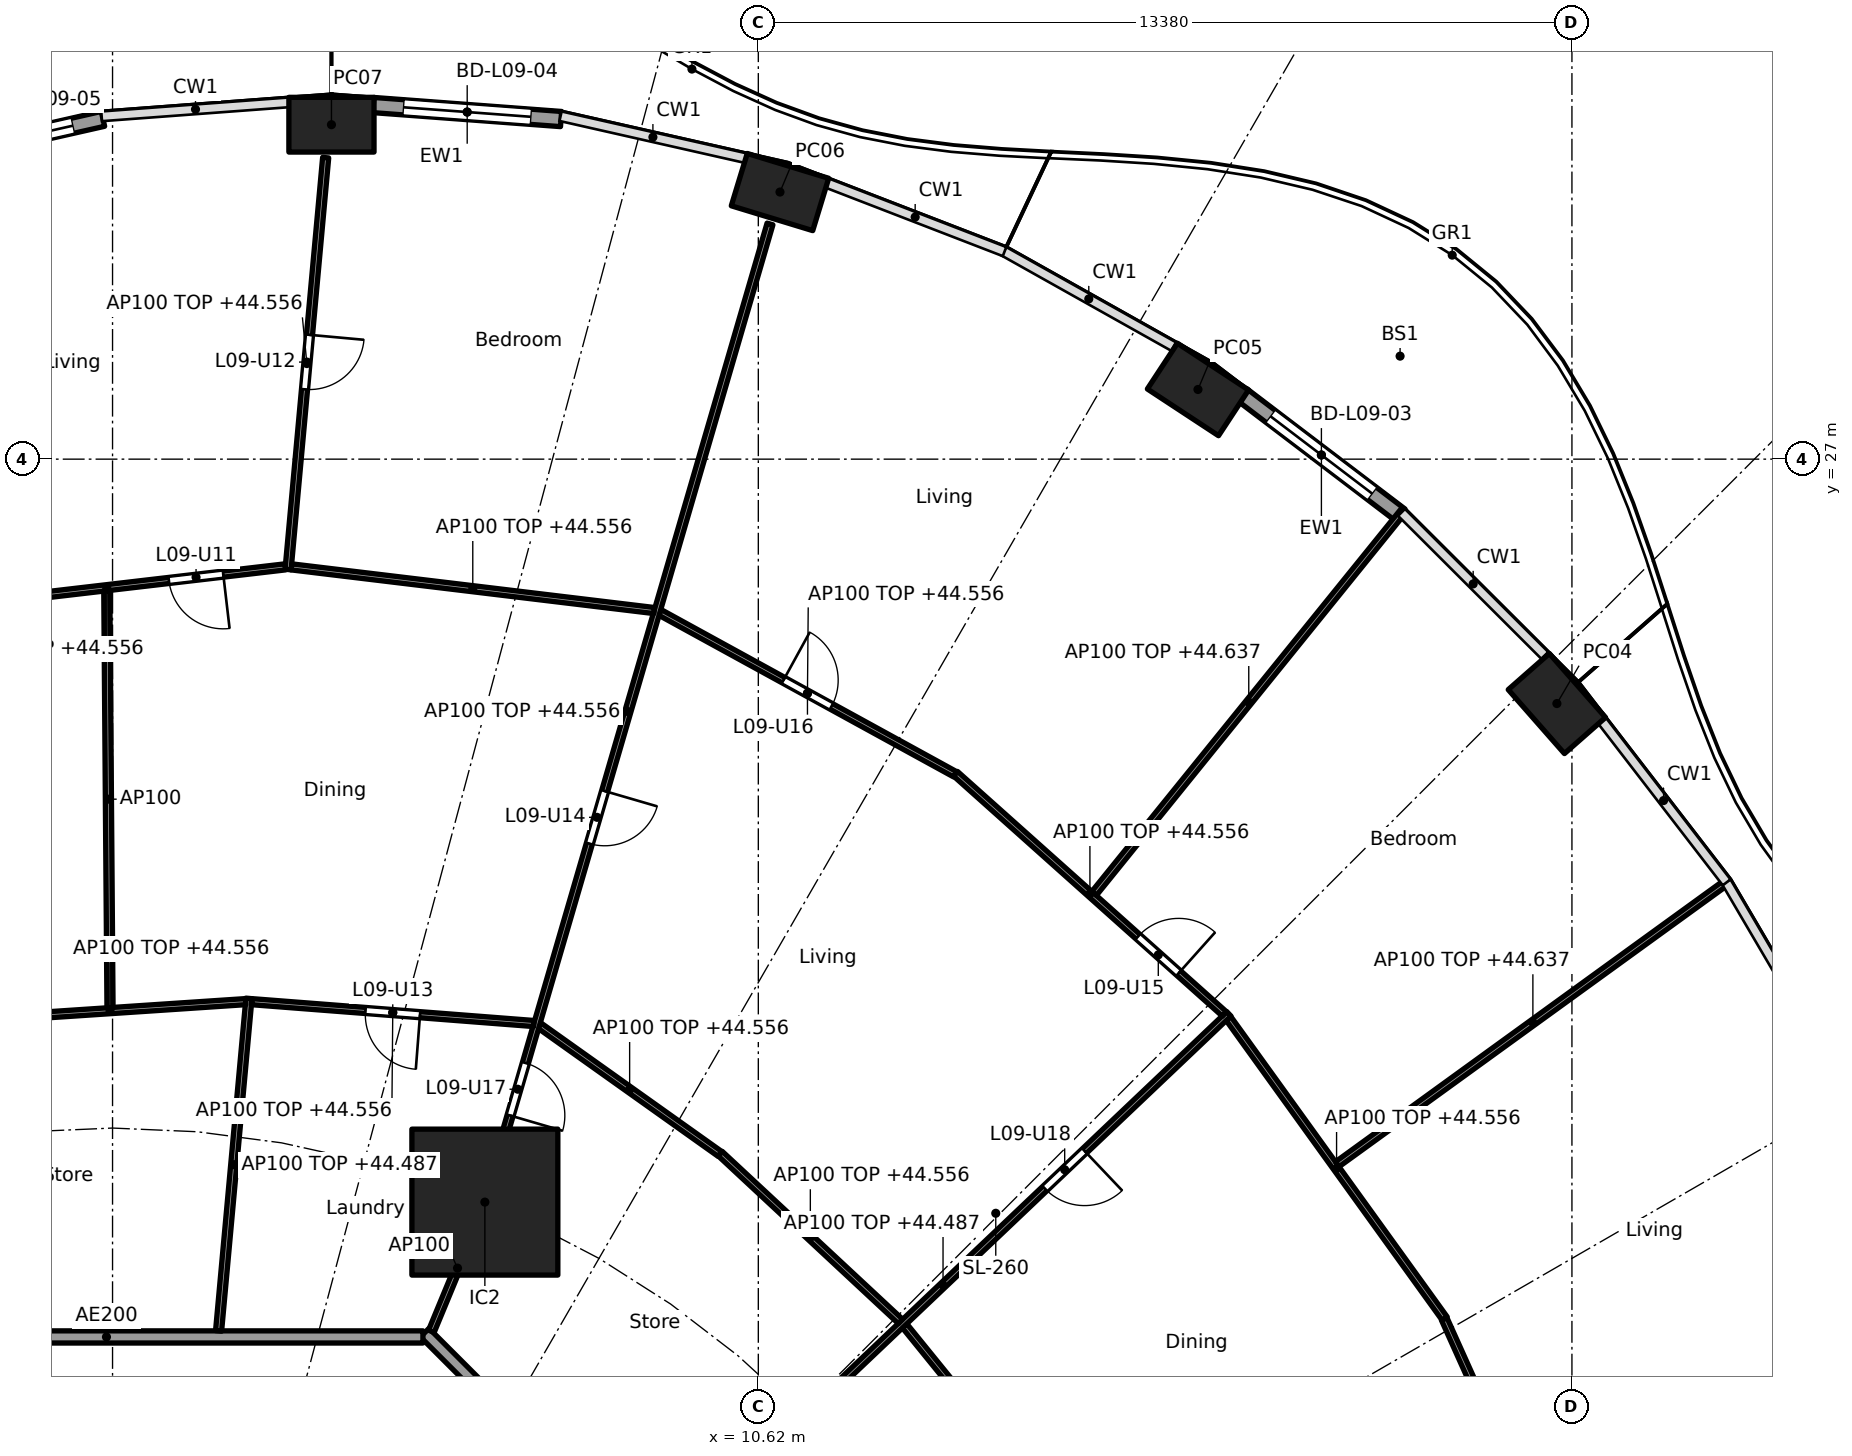
"""IFC4 building model, lengths in metres.
Left out: names, types, materials, properties, quantities, classifications, styles, units other than length and angle.
Written with IfcOpenShell. Run it as: python <this file> out.ifc"""

import sys

from ifc_helpers import new_model, si_unit, direction, frame, frame_2d, origin, origin_2d, place, context, subcontext, project, spatial, rectangle, hollow_rectangle, extrude, element, fill, save


model = new_model("IFC4")
c1 = context("Model", 3, precision=1e-05, world=origin(), true_north=direction((0.0, 1.0)))
c2 = subcontext(c1, "Body", "Model", "MODEL_VIEW")
j1 = project(units=[si_unit("LENGTHUNIT", "METRE"), si_unit("PLANEANGLEUNIT", "RADIAN")], contexts=[c1])
p1 = place(None, origin())
s1 = spatial("IfcSite", under=j1, at=p1, CompositionType="ELEMENT")
p2 = place(p1, origin())
s2 = spatial("IfcBuilding", under=s1, at=p2, CompositionType="ELEMENT")
p3 = place(p2, frame((0.0, 0.0, 41.8)))
s3 = spatial("IfcBuildingStorey", under=s2, at=p3, CompositionType="ELEMENT", Elevation=41.8)
for number, where, z_axis, x_axis in (
    (1, (23.752, 22.981, 0.0), (0.0, 0.0, 1.0), (-0.66, 0.751, 0.0)),
    (2, (17.85, 28.146, 0.0), (0.0, 0.0, 1.0), (-0.836, 0.549, 0.0)),
    (3, (10.976, 31.393, 0.0), (0.0, 0.0, 1.0), (-0.957, 0.292, 0.0)),
    (4, (3.6, 32.5, 0.0), (0.0, 0.0, 1.0), (-1.0, 0.0, 0.0)),
):
    element("IfcColumn", number, at=place(p3, frame(where, z_axis=z_axis, x_axis=x_axis)), inside=s3, PredefinedType="COLUMN", context=c2, shape_type="SweptSolid", body=[
        extrude(hollow_rectangle(XDim=1.4, YDim=0.9, WallThickness=0.05, at=origin_2d()), origin(), (0.0, 0.0, 1.0), 3.7),
    ])
p4 = place(p3, frame((6.123, 14.782, 0.0), z_axis=(0.0, 0.0, 1.0), x_axis=(1.0, 0.0, 0.0)))
e5 = element("IfcColumn", 5, at=p4, inside=s3, PredefinedType="COLUMN", context=c2, shape_type="SweptSolid", body=[
    extrude(rectangle(XDim=2.4, YDim=2.4, at=origin_2d()), origin(), (0.0, 0.0, 1.0), 3.7),
])
p5 = place(p3, frame((18.582, 28.056, 0.0), z_axis=(0.0, 0.0, 1.0), x_axis=(0.796022293214, -0.605267303517, 0.0)))
e6 = element("IfcWall", 6, at=p5, inside=s3, PredefinedType="SOLIDWALL", context=c2, shape_type="SweptSolid", body=[
    extrude(rectangle(XDim=3.262, YDim=0.25, at=frame_2d((1.631, 0.0))), origin(), (0.0, 0.0, 1.0), 3.44),
])
p6 = place(p5, frame((0.581, 0.0, 0.0)))
e7 = element("IfcOpeningElement", 7, at=p6, cuts=e6, PredefinedType="OPENING", context=c2, shape_type="SweptSolid", body=[
    extrude(rectangle(XDim=2.1, YDim=2.4, at=frame_2d((1.05, 1.2))), frame((0.0, 0.135, 0.0), z_axis=(0.0, -1.0, 0.0), x_axis=(1.0, 0.0, 0.0)), (0.0, 0.0, 1.0), 0.27),
])
p7 = place(p3, frame((4.289, 32.823, 0.0), z_axis=(0.0, 0.0, 1.0), x_axis=(0.997230834878, -0.074368420505, 0.0)))
e8 = element("IfcWall", 8, at=p7, inside=s3, PredefinedType="SOLIDWALL", context=c2, shape_type="SweptSolid", body=[
    extrude(rectangle(XDim=3.096, YDim=0.25, at=frame_2d((1.548, 0.0))), origin(), (0.0, 0.0, 1.0), 3.44),
])
p8 = place(p7, frame((0.498, 0.0, 0.0)))
e9 = element("IfcOpeningElement", 9, at=p8, cuts=e8, PredefinedType="OPENING", context=c2, shape_type="SweptSolid", body=[
    extrude(rectangle(XDim=2.1, YDim=2.4, at=frame_2d((1.05, 1.2))), frame((0.0, 0.135, 0.0), z_axis=(0.0, -1.0, 0.0), x_axis=(1.0, 0.0, 0.0)), (0.0, 0.0, 1.0), 0.27),
])
p9 = place(p3, frame((-3.195, 31.908, 0.0), z_axis=(0.0, 0.0, 1.0), x_axis=(0.975331134677, 0.220746863466, 0.0)))
e10 = element("IfcWall", 10, at=p9, inside=s3, PredefinedType="SOLIDWALL", context=c2, shape_type="SweptSolid", body=[
    extrude(rectangle(XDim=3.115, YDim=0.25, at=frame_2d((1.557, 0.0))), origin(), (0.0, 0.0, 1.0), 3.44),
])
p10 = place(p9, frame((0.507, 0.0, 0.0)))
e11 = element("IfcOpeningElement", 11, at=p10, cuts=e10, PredefinedType="OPENING", context=c2, shape_type="SweptSolid", body=[
    extrude(rectangle(XDim=2.1, YDim=2.4, at=frame_2d((1.05, 1.2))), frame((0.0, 0.135, 0.0), z_axis=(0.0, -1.0, 0.0), x_axis=(1.0, 0.0, 0.0)), (0.0, 0.0, 1.0), 0.27),
])
p11 = place(p3, frame((12.635, 5.134, 0.0), z_axis=(0.0, 0.0, 1.0), x_axis=(-0.707106781187, 0.707106781187, 0.0)))
e12 = element("IfcWall", 12, at=p11, inside=s3, PredefinedType="PARTITIONING", context=c2, shape_type="SweptSolid", body=[
    extrude(rectangle(XDim=10.609, YDim=0.2, at=frame_2d((5.305, 0.0))), origin(), (0.0, 0.0, 1.0), 3.44),
])
p12 = place(p3, frame((5.104, 12.565, 0.0), z_axis=(0.0, 0.0, 1.0), x_axis=(-1.0, 0.0, 0.0)))
e13 = element("IfcWall", 13, at=p12, inside=s3, PredefinedType="PARTITIONING", context=c2, shape_type="SweptSolid", body=[
    extrude(rectangle(XDim=10.409, YDim=0.2, at=frame_2d((5.205, 0.0))), origin(), (0.0, 0.0, 1.0), 3.44),
])
p13 = place(p3, frame((24.273, 7.584, 0.0), z_axis=(0.0, 0.0, 1.0), x_axis=(-0.410201529109, 0.911994904326, 0.0)))
e14 = element("IfcWall", 14, at=p13, inside=s3, PredefinedType="PARTITIONING", context=c2, shape_type="SweptSolid", body=[
    extrude(rectangle(XDim=5.787, YDim=0.1, at=frame_2d((2.894, 0.0))), origin(), (0.0, 0.0, 1.0), 2.756),
])
p14 = place(p13, frame((2.444, 0.0, 0.0)))
e15 = element("IfcOpeningElement", 15, at=p14, cuts=e14, PredefinedType="OPENING", context=c2, shape_type="SweptSolid", body=[
    extrude(rectangle(XDim=0.9, YDim=2.1, at=frame_2d((0.45, 1.05))), frame((0.0, 0.06, 0.0), z_axis=(0.0, -1.0, 0.0), x_axis=(1.0, 0.0, 0.0)), (0.0, 0.0, 1.0), 0.12),
])
p15 = place(p3, frame((15.614, 9.559, 0.0), z_axis=(0.0, 0.0, 1.0), x_axis=(-0.63012473344, 0.776493928056, 0.0)))
e16 = element("IfcWall", 16, at=p15, inside=s3, PredefinedType="PARTITIONING", context=c2, shape_type="SweptSolid", body=[
    extrude(rectangle(XDim=4.106, YDim=0.1, at=frame_2d((2.053, 0.0))), origin(), (0.0, 0.0, 1.0), 2.756),
])
p16 = place(p15, frame((1.628, 0.0, 0.0)))
e17 = element("IfcOpeningElement", 17, at=p16, cuts=e16, PredefinedType="OPENING", context=c2, shape_type="SweptSolid", body=[
    extrude(rectangle(XDim=0.9, YDim=2.1, at=frame_2d((0.45, 1.05))), frame((0.0, 0.06, 0.0), z_axis=(0.0, -1.0, 0.0), x_axis=(1.0, 0.0, 0.0)), (0.0, 0.0, 1.0), 0.12),
])
p17 = place(p3, frame((21.908, 12.866, 0.0), z_axis=(0.0, 0.0, 1.0), x_axis=(-0.584558392935, 0.811351640936, 0.0)))
e18 = element("IfcWall", 18, at=p17, inside=s3, PredefinedType="PARTITIONING", context=c2, shape_type="SweptSolid", body=[
    extrude(rectangle(XDim=6.084, YDim=0.1, at=frame_2d((3.042, 0.0))), origin(), (0.0, 0.0, 1.0), 2.756),
])
p18 = place(p3, frame((20.141, 15.405, 0.0), z_axis=(0.0, 0.0, 1.0), x_axis=(0.809834895779, 0.58665785734, 0.0)))
e19 = element("IfcWall", 19, at=p18, inside=s3, PredefinedType="PARTITIONING", context=c2, shape_type="SweptSolid", body=[
    extrude(rectangle(XDim=7.945, YDim=0.1, at=frame_2d((3.973, 0.0))), origin(), (0.0, 0.0, 1.0), 2.837),
])
p19 = place(p3, frame((8.957, 8.953, 0.0), z_axis=(0.0, 0.0, 1.0), x_axis=(0.725250022034, 0.688485588476, 0.0)))
e20 = element("IfcWall", 20, at=p19, inside=s3, PredefinedType="PARTITIONING", context=c2, shape_type="SweptSolid", body=[
    extrude(rectangle(XDim=12.963, YDim=0.1, at=frame_2d((6.481, 0.0))), origin(), (0.0, 0.0, 1.0), 2.687),
])
p20 = place(p19, frame((8.79, 0.0, 0.0)))
e21 = element("IfcOpeningElement", 21, at=p20, cuts=e20, PredefinedType="OPENING", context=c2, shape_type="SweptSolid", body=[
    extrude(rectangle(XDim=0.9, YDim=2.1, at=frame_2d((0.45, 1.05))), frame((0.0, 0.06, 0.0), z_axis=(0.0, -1.0, 0.0), x_axis=(1.0, 0.0, 0.0)), (0.0, 0.0, 1.0), 0.12),
])
p21 = place(p3, frame((12.958, 12.82, 0.0), z_axis=(0.0, 0.0, 1.0), x_axis=(-0.732028724098, 0.681273768096, 0.0)))
e22 = element("IfcWall", 22, at=p21, inside=s3, PredefinedType="PARTITIONING", context=c2, shape_type="SweptSolid", body=[
    extrude(rectangle(XDim=4.05, YDim=0.1, at=frame_2d((2.025, 0.0))), origin(), (0.0, 0.0, 1.0), 2.756),
])
p22 = place(p3, frame((18.285, 17.877, 0.0), z_axis=(0.0, 0.0, 1.0), x_axis=(-0.745812746724, 0.666155647596, 0.0)))
e23 = element("IfcWall", 23, at=p22, inside=s3, PredefinedType="PARTITIONING", context=c2, shape_type="SweptSolid", body=[
    extrude(rectangle(XDim=5.931, YDim=0.1, at=frame_2d((2.965, 0.0))), origin(), (0.0, 0.0, 1.0), 2.756),
])
p23 = place(p22, frame((1.008, 0.0, 0.0)))
e24 = element("IfcOpeningElement", 24, at=p23, cuts=e23, PredefinedType="OPENING", context=c2, shape_type="SweptSolid", body=[
    extrude(rectangle(XDim=0.9, YDim=2.1, at=frame_2d((0.45, 1.05))), frame((0.0, 0.06, 0.0), z_axis=(0.0, -1.0, 0.0), x_axis=(1.0, 0.0, 0.0)), (0.0, 0.0, 1.0), 0.12),
])
p24 = place(p3, frame((16.142, 19.858, 0.0), z_axis=(0.0, 0.0, 1.0), x_axis=(0.628738066508, 0.777617157555, 0.0)))
e25 = element("IfcWall", 25, at=p24, inside=s3, PredefinedType="PARTITIONING", context=c2, shape_type="SweptSolid", body=[
    extrude(rectangle(XDim=8.091, YDim=0.1, at=frame_2d((4.045, 0.0))), origin(), (0.0, 0.0, 1.0), 2.837),
])
p25 = place(p3, frame((9.989, 15.574, 0.0), z_axis=(0.0, 0.0, 1.0), x_axis=(-0.81494477814, 0.57953861699, 0.0)))
e26 = element("IfcWall", 26, at=p25, inside=s3, PredefinedType="PARTITIONING", context=c2, shape_type="SweptSolid", body=[
    extrude(rectangle(XDim=3.644, YDim=0.1, at=frame_2d((1.822, 0.0))), origin(), (0.0, 0.0, 1.0), 2.756),
])
p26 = place(p3, frame((13.855, 21.818, 0.0), z_axis=(0.0, 0.0, 1.0), x_axis=(-0.876794415294, 0.480865421203, 0.0)))
e27 = element("IfcWall", 27, at=p26, inside=s3, PredefinedType="PARTITIONING", context=c2, shape_type="SweptSolid", body=[
    extrude(rectangle(XDim=5.536, YDim=0.1, at=frame_2d((2.768, 0.0))), origin(), (0.0, 0.0, 1.0), 2.756),
])
p27 = place(p26, frame((2.318, 0.0, 0.0)))
e28 = element("IfcOpeningElement", 28, at=p27, cuts=e27, PredefinedType="OPENING", context=c2, shape_type="SweptSolid", body=[
    extrude(rectangle(XDim=0.9, YDim=2.1, at=frame_2d((0.45, 1.05))), frame((0.0, 0.06, 0.0), z_axis=(0.0, -1.0, 0.0), x_axis=(1.0, 0.0, 0.0)), (0.0, 0.0, 1.0), 0.12),
])
p28 = place(p3, frame((5.243, 12.657, 0.0), z_axis=(0.0, 0.0, 1.0), x_axis=(0.382719158442, 0.923864733477, 0.0)))
e29 = element("IfcWall", 29, at=p28, inside=s3, PredefinedType="PARTITIONING", context=c2, shape_type="SweptSolid", body=[
    extrude(rectangle(XDim=2.25, YDim=0.1, at=frame_2d((1.125, 0.0))), origin(), (0.0, 0.0, 1.0), 3.44),
])
p29 = place(p3, frame((6.137, 14.83, 0.0), z_axis=(0.0, 0.0, 1.0), x_axis=(0.27985745069, 0.960041565399, 0.0)))
e30 = element("IfcWall", 30, at=p29, inside=s3, PredefinedType="PARTITIONING", context=c2, shape_type="SweptSolid", body=[
    extrude(rectangle(XDim=16.705, YDim=0.1, at=frame_2d((8.353, 0.0))), origin(), (0.0, 0.0, 1.0), 2.756),
])
p30 = place(p29, frame((6.091, 0.0, 0.0)))
e31 = element("IfcOpeningElement", 31, at=p30, cuts=e30, PredefinedType="OPENING", context=c2, shape_type="SweptSolid", body=[
    extrude(rectangle(XDim=0.9, YDim=2.1, at=frame_2d((0.45, 1.05))), frame((0.0, 0.06, 0.0), z_axis=(0.0, -1.0, 0.0), x_axis=(1.0, 0.0, 0.0)), (0.0, 0.0, 1.0), 0.12),
])
p31 = place(p29, frame((1.434, 0.0, 0.0)))
e32 = element("IfcOpeningElement", 32, at=p31, cuts=e30, PredefinedType="OPENING", context=c2, shape_type="SweptSolid", body=[
    extrude(rectangle(XDim=0.9, YDim=2.1, at=frame_2d((0.45, 1.05))), frame((0.0, 0.06, 0.0), z_axis=(0.0, -1.0, 0.0), x_axis=(1.0, 0.0, 0.0)), (0.0, 0.0, 1.0), 0.12),
])
p32 = place(p3, frame((6.928, 17.719, 0.0), z_axis=(0.0, 0.0, 1.0), x_axis=(-0.997017959142, 0.077169872028, 0.0)))
e33 = element("IfcWall", 33, at=p32, inside=s3, PredefinedType="PARTITIONING", context=c2, shape_type="SweptSolid", body=[
    extrude(rectangle(XDim=4.654, YDim=0.1, at=frame_2d((2.327, 0.0))), origin(), (0.0, 0.0, 1.0), 2.756),
])
p33 = place(p32, frame((1.877, 0.0, 0.0)))
e34 = element("IfcOpeningElement", 34, at=p33, cuts=e33, PredefinedType="OPENING", context=c2, shape_type="SweptSolid", body=[
    extrude(rectangle(XDim=0.9, YDim=2.1, at=frame_2d((0.45, 1.05))), frame((0.0, 0.06, 0.0), z_axis=(0.0, -1.0, 0.0), x_axis=(1.0, 0.0, 0.0)), (0.0, 0.0, 1.0), 0.12),
])
p34 = place(p3, frame((8.907, 24.51, 0.0), z_axis=(0.0, 0.0, 1.0), x_axis=(-0.992836798252, 0.119478416615, 0.0)))
e35 = element("IfcWall", 35, at=p34, inside=s3, PredefinedType="PARTITIONING", context=c2, shape_type="SweptSolid", body=[
    extrude(rectangle(XDim=6.01, YDim=0.1, at=frame_2d((3.005, 0.0))), origin(), (0.0, 0.0, 1.0), 2.756),
])
p35 = place(p3, frame((1.744, 12.664, 0.0), z_axis=(0.0, 0.0, 1.0), x_axis=(0.090888552747, 0.995861070119, 0.0)))
e36 = element("IfcWall", 36, at=p35, inside=s3, PredefinedType="PARTITIONING", context=c2, shape_type="SweptSolid", body=[
    extrude(rectangle(XDim=5.49, YDim=0.1, at=frame_2d((2.745, 0.0))), origin(), (0.0, 0.0, 1.0), 2.687),
])
p36 = place(p3, frame((2.188, 18.079, 0.0), z_axis=(0.0, 0.0, 1.0), x_axis=(-0.997791437766, -0.066424744789, 0.0)))
e37 = element("IfcWall", 37, at=p36, inside=s3, PredefinedType="PARTITIONING", context=c2, shape_type="SweptSolid", body=[
    extrude(rectangle(XDim=4.469, YDim=0.1, at=frame_2d((2.235, 0.0))), origin(), (0.0, 0.0, 1.0), 2.756),
])
p37 = place(p3, frame((2.887, 25.185, 0.0), z_axis=(0.0, 0.0, 1.0), x_axis=(0.090885272046, 0.995861369531, 0.0)))
e38 = element("IfcWall", 38, at=p37, inside=s3, PredefinedType="PARTITIONING", context=c2, shape_type="SweptSolid", body=[
    extrude(rectangle(XDim=6.802, YDim=0.1, at=frame_2d((3.401, 0.0))), origin(), (0.0, 0.0, 1.0), 2.756),
])
p38 = place(p37, frame((2.976, 0.0, 0.0)))
e39 = element("IfcOpeningElement", 39, at=p38, cuts=e38, PredefinedType="OPENING", context=c2, shape_type="SweptSolid", body=[
    extrude(rectangle(XDim=0.9, YDim=2.1, at=frame_2d((0.45, 1.05))), frame((0.0, 0.06, 0.0), z_axis=(0.0, -1.0, 0.0), x_axis=(1.0, 0.0, 0.0)), (0.0, 0.0, 1.0), 0.12),
])
p39 = place(p3, frame((2.842, 25.229, 0.0), z_axis=(0.0, 0.0, 1.0), x_axis=(-0.993255612046, -0.115945198862, 0.0)))
e40 = element("IfcWall", 40, at=p39, inside=s3, PredefinedType="PARTITIONING", context=c2, shape_type="SweptSolid", body=[
    extrude(rectangle(XDim=5.913, YDim=0.1, at=frame_2d((2.956, 0.0))), origin(), (0.0, 0.0, 1.0), 2.756),
])
p40 = place(p39, frame((1.028, 0.0, 0.0)))
e41 = element("IfcOpeningElement", 41, at=p40, cuts=e40, PredefinedType="OPENING", context=c2, shape_type="SweptSolid", body=[
    extrude(rectangle(XDim=0.9, YDim=2.1, at=frame_2d((0.45, 1.05))), frame((0.0, 0.06, 0.0), z_axis=(0.0, -1.0, 0.0), x_axis=(1.0, 0.0, 0.0)), (0.0, 0.0, 1.0), 0.12),
])
p41 = place(p3, frame((-0.042, 17.98, 0.0), z_axis=(0.0, 0.0, 1.0), x_axis=(-0.007692080119, 0.999970415514, 0.0)))
e42 = element("IfcWall", 42, at=p41, inside=s3, PredefinedType="PARTITIONING", context=c2, shape_type="SweptSolid", body=[
    extrude(rectangle(XDim=6.856, YDim=0.1, at=frame_2d((3.428, 0.0))), origin(), (0.0, 0.0, 1.0), 3.44),
])
p42 = place(p6, origin())
e43 = element("IfcDoor", 43, at=p42, inside=s3, OperationType="SLIDING_TO_LEFT", PredefinedType="DOOR", context=c2, shape_type="SweptSolid", body=[
    extrude(rectangle(XDim=2.1, YDim=2.4, at=frame_2d((1.05, 1.2))), frame((0.0, 0.025, 0.0), z_axis=(0.0, -1.0, 0.0), x_axis=(1.0, 0.0, 0.0)), (0.0, 0.0, 1.0), 0.05),
])
fill(e7, e43)
p43 = place(p8, origin())
e44 = element("IfcDoor", 44, at=p43, inside=s3, OperationType="SLIDING_TO_LEFT", PredefinedType="DOOR", context=c2, shape_type="SweptSolid", body=[
    extrude(rectangle(XDim=2.1, YDim=2.4, at=frame_2d((1.05, 1.2))), frame((0.0, 0.025, 0.0), z_axis=(0.0, -1.0, 0.0), x_axis=(1.0, 0.0, 0.0)), (0.0, 0.0, 1.0), 0.05),
])
fill(e9, e44)
p44 = place(p10, origin())
e45 = element("IfcDoor", 45, at=p44, inside=s3, OperationType="SLIDING_TO_LEFT", PredefinedType="DOOR", context=c2, shape_type="SweptSolid", body=[
    extrude(rectangle(XDim=2.1, YDim=2.4, at=frame_2d((1.05, 1.2))), frame((0.0, 0.025, 0.0), z_axis=(0.0, -1.0, 0.0), x_axis=(1.0, 0.0, 0.0)), (0.0, 0.0, 1.0), 0.05),
])
fill(e11, e45)
p45 = place(p40, origin())
e46 = element("IfcDoor", 46, at=p45, inside=s3, OperationType="SINGLE_SWING_LEFT", PredefinedType="DOOR", context=c2, shape_type="SweptSolid", body=[
    extrude(rectangle(XDim=0.9, YDim=2.1, at=frame_2d((0.45, 1.05))), frame((0.0, 0.025, 0.0), z_axis=(0.0, -1.0, 0.0), x_axis=(1.0, 0.0, 0.0)), (0.0, 0.0, 1.0), 0.05),
])
fill(e41, e46)
p46 = place(p38, frame((0.9, 0.0, 0.0), x_axis=(-1.0, 0.0, 0.0)))
e47 = element("IfcDoor", 47, at=p46, inside=s3, OperationType="SINGLE_SWING_LEFT", PredefinedType="DOOR", context=c2, shape_type="SweptSolid", body=[
    extrude(rectangle(XDim=0.9, YDim=2.1, at=frame_2d((0.45, 1.05))), frame((0.0, 0.025, 0.0), z_axis=(0.0, -1.0, 0.0), x_axis=(1.0, 0.0, 0.0)), (0.0, 0.0, 1.0), 0.05),
])
fill(e39, e47)
p47 = place(p33, origin())
e48 = element("IfcDoor", 48, at=p47, inside=s3, OperationType="SINGLE_SWING_LEFT", PredefinedType="DOOR", context=c2, shape_type="SweptSolid", body=[
    extrude(rectangle(XDim=0.9, YDim=2.1, at=frame_2d((0.45, 1.05))), frame((0.0, 0.025, 0.0), z_axis=(0.0, -1.0, 0.0), x_axis=(1.0, 0.0, 0.0)), (0.0, 0.0, 1.0), 0.05),
])
fill(e34, e48)
p48 = place(p30, frame((0.9, 0.0, 0.0), x_axis=(-1.0, 0.0, 0.0)))
e49 = element("IfcDoor", 49, at=p48, inside=s3, OperationType="SINGLE_SWING_LEFT", PredefinedType="DOOR", context=c2, shape_type="SweptSolid", body=[
    extrude(rectangle(XDim=0.9, YDim=2.1, at=frame_2d((0.45, 1.05))), frame((0.0, 0.025, 0.0), z_axis=(0.0, -1.0, 0.0), x_axis=(1.0, 0.0, 0.0)), (0.0, 0.0, 1.0), 0.05),
])
fill(e31, e49)
p49 = place(p23, frame((0.9, 0.0, 0.0), x_axis=(-1.0, 0.0, 0.0)))
e50 = element("IfcDoor", 50, at=p49, inside=s3, OperationType="SINGLE_SWING_RIGHT", PredefinedType="DOOR", context=c2, shape_type="SweptSolid", body=[
    extrude(rectangle(XDim=0.9, YDim=2.1, at=frame_2d((0.45, 1.05))), frame((0.0, 0.025, 0.0), z_axis=(0.0, -1.0, 0.0), x_axis=(1.0, 0.0, 0.0)), (0.0, 0.0, 1.0), 0.05),
])
fill(e24, e50)
p50 = place(p27, frame((0.9, 0.0, 0.0), x_axis=(-1.0, 0.0, 0.0)))
e51 = element("IfcDoor", 51, at=p50, inside=s3, OperationType="SINGLE_SWING_LEFT", PredefinedType="DOOR", context=c2, shape_type="SweptSolid", body=[
    extrude(rectangle(XDim=0.9, YDim=2.1, at=frame_2d((0.45, 1.05))), frame((0.0, 0.025, 0.0), z_axis=(0.0, -1.0, 0.0), x_axis=(1.0, 0.0, 0.0)), (0.0, 0.0, 1.0), 0.05),
])
fill(e28, e51)
p51 = place(p31, frame((0.9, 0.0, 0.0), x_axis=(-1.0, 0.0, 0.0)))
e52 = element("IfcDoor", 52, at=p51, inside=s3, OperationType="SINGLE_SWING_RIGHT", PredefinedType="DOOR", context=c2, shape_type="SweptSolid", body=[
    extrude(rectangle(XDim=0.9, YDim=2.1, at=frame_2d((0.45, 1.05))), frame((0.0, 0.025, 0.0), z_axis=(0.0, -1.0, 0.0), x_axis=(1.0, 0.0, 0.0)), (0.0, 0.0, 1.0), 0.05),
])
fill(e32, e52)
p52 = place(p20, frame((0.9, 0.0, 0.0), x_axis=(-1.0, 0.0, 0.0)))
e53 = element("IfcDoor", 53, at=p52, inside=s3, OperationType="SINGLE_SWING_LEFT", PredefinedType="DOOR", context=c2, shape_type="SweptSolid", body=[
    extrude(rectangle(XDim=0.9, YDim=2.1, at=frame_2d((0.45, 1.05))), frame((0.0, 0.025, 0.0), z_axis=(0.0, -1.0, 0.0), x_axis=(1.0, 0.0, 0.0)), (0.0, 0.0, 1.0), 0.05),
])
fill(e21, e53)
save(model, sys.argv[1])
